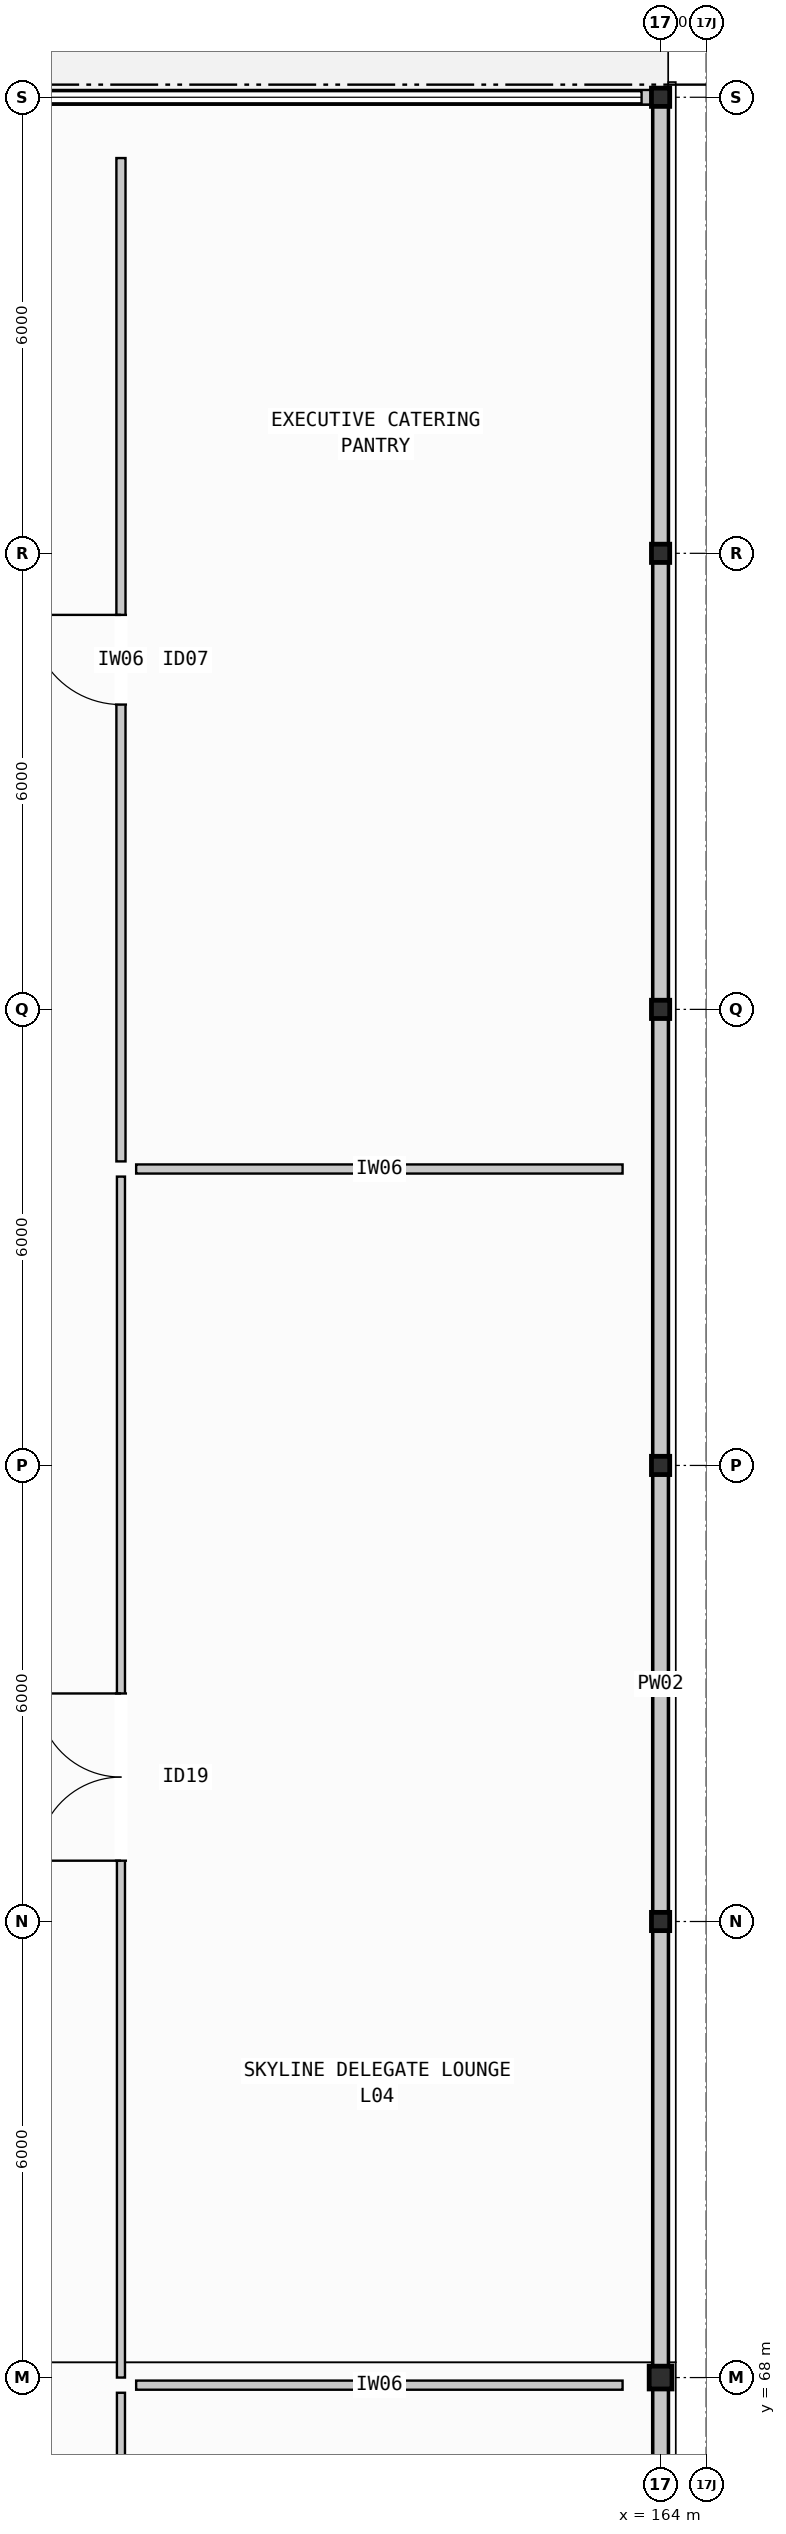
"""IFC4 building model, lengths in metres.
Left out: names, types, materials, properties, quantities, classifications, styles, units other than length and angle.
Written with IfcOpenShell. Run it as: python <this file> out.ifc"""

import sys

from ifc_helpers import new_model, si_unit, direction, frame, frame_2d, origin, origin_2d, place, context, subcontext, project, spatial, rectangle, i_section, extrude, element, fill, save


model = new_model("IFC4")
c1 = context("Model", 3, precision=1e-05, world=origin(), true_north=direction((0.0, 1.0)))
c2 = subcontext(c1, "Body", "Model", "MODEL_VIEW")
j1 = project(units=[si_unit("LENGTHUNIT", "METRE"), si_unit("PLANEANGLEUNIT", "RADIAN")], contexts=[c1])
p1 = place(None, origin())
s1 = spatial("IfcSite", under=j1, at=p1, CompositionType="ELEMENT")
p2 = place(p1, origin())
s2 = spatial("IfcBuilding", under=s1, at=p2, CompositionType="ELEMENT")
p3 = place(p2, frame((0.0, 0.0, 21.6)))
s3 = spatial("IfcBuildingStorey", under=s2, at=p3, CompositionType="ELEMENT", Elevation=21.6)
p4 = place(p3, frame((164.0, 68.0, 0.0), z_axis=(0.0, 0.0, 1.0), x_axis=(1.0, 0.0, 0.0)))
e1 = element("IfcColumn", 1, at=p4, inside=s3, PredefinedType="COLUMN", context=c2, shape_type="SweptSolid", body=[
    extrude(i_section(OverallWidth=0.3, OverallDepth=0.3, WebThickness=0.011, FlangeThickness=0.019, FilletRadius=0.027, at=origin_2d()), origin(), (0.0, 0.0, 1.0), 4.8),
])
for number, where, z_axis, x_axis in (
    (2, (164.0, 74.0, 0.0), (0.0, 0.0, 1.0), (1.0, 0.0, 0.0)),
    (3, (164.0, 80.0, 0.0), (0.0, 0.0, 1.0), (1.0, 0.0, 0.0)),
    (4, (164.0, 86.0, 0.0), (0.0, 0.0, 1.0), (1.0, 0.0, 0.0)),
    (5, (164.0, 92.0, 0.0), (0.0, 0.0, 1.0), (1.0, 0.0, 0.0)),
    (6, (164.0, 98.0, 0.0), (0.0, 0.0, 1.0), (1.0, 0.0, 0.0)),
):
    element("IfcColumn", number, at=place(p3, frame(where, z_axis=z_axis, x_axis=x_axis)), inside=s3, PredefinedType="COLUMN", context=c2, shape_type="SweptSolid", body=[
        extrude(i_section(OverallWidth=0.24, OverallDepth=0.24, WebThickness=0.01, FlangeThickness=0.017, FilletRadius=0.021, at=origin_2d()), origin(), (0.0, 0.0, 1.0), 4.8),
    ])
p5 = place(p3, frame((164.0, 62.146, 0.0), z_axis=(0.0, 0.0, 1.0), x_axis=(0.0, 1.0, 0.0)))
e7 = element("IfcWall", 7, at=p5, inside=s3, PredefinedType="STANDARD", context=c2, shape_type="SweptSolid", body=[
    extrude(rectangle(XDim=5.708, YDim=0.222, at=frame_2d((2.854, 0.0))), origin(), (0.0, 0.0, 1.0), 4.0),
])
p6 = place(p3, frame((164.0, 68.146, 0.0), z_axis=(0.0, 0.0, 1.0), x_axis=(0.0, 1.0, 0.0)))
e8 = element("IfcWall", 8, at=p6, inside=s3, PredefinedType="STANDARD", context=c2, shape_type="SweptSolid", body=[
    extrude(rectangle(XDim=5.738, YDim=0.222, at=frame_2d((2.869, 0.0))), origin(), (0.0, 0.0, 1.0), 4.0),
])
for number, where, z_axis, x_axis in (
    (9, (164.0, 74.116, 0.0), (0.0, 0.0, 1.0), (0.0, 1.0, 0.0)),
    (10, (164.0, 80.116, 0.0), (0.0, 0.0, 1.0), (0.0, 1.0, 0.0)),
    (11, (164.0, 86.116, 0.0), (0.0, 0.0, 1.0), (0.0, 1.0, 0.0)),
    (12, (164.0, 92.116, 0.0), (0.0, 0.0, 1.0), (0.0, 1.0, 0.0)),
):
    element("IfcWall", number, at=place(p3, frame(where, z_axis=z_axis, x_axis=x_axis)), inside=s3, PredefinedType="STANDARD", context=c2, shape_type="SweptSolid", body=[
        extrude(rectangle(XDim=5.768, YDim=0.222, at=frame_2d((2.884, 0.0))), origin(), (0.0, 0.0, 1.0), 4.0),
    ])
p7 = place(p3, frame((164.0, 38.08, 4.8), z_axis=(0.0, 0.0, 1.0), x_axis=(0.0, 1.0, 0.0)))
e13 = element("IfcWall", 13, at=p7, inside=s3, PredefinedType="PARAPET", context=c2, shape_type="SweptSolid", body=[
    extrude(rectangle(XDim=59.84, YDim=0.192, at=frame_2d((29.92, 0.0))), origin(), (0.0, 0.0, 1.0), 0.95),
])
p8 = place(p3, frame((146.6, 98.0, 4.8), z_axis=(0.0, 0.0, 1.0), x_axis=(1.0, 0.0, 0.0)))
e14 = element("IfcWall", 14, at=p8, inside=s3, PredefinedType="PARAPET", context=c2, shape_type="SweptSolid", body=[
    extrude(rectangle(XDim=17.4, YDim=0.192, at=frame_2d((8.7, 0.0))), origin(), (0.0, 0.0, 1.0), 0.95),
])
p9 = place(p3, frame((156.9, 52.0, 0.0), z_axis=(0.0, 0.0, 1.0), x_axis=(0.0, 1.0, 0.0)))
e15 = element("IfcWall", 15, at=p9, inside=s3, PredefinedType="PARTITIONING", context=c2, shape_type="SweptSolid", body=[
    extrude(rectangle(XDim=15.8, YDim=0.106, at=frame_2d((7.9, 0.0))), origin(), (0.0, 0.0, 1.0), 4.0),
])
p10 = place(p9, frame((7.34, 0.0, 0.0)))
e16 = element("IfcOpeningElement", 16, at=p10, cuts=e15, PredefinedType="OPENING", context=c2, shape_type="SweptSolid", body=[
    extrude(rectangle(XDim=1.12, YDim=2.22, at=frame_2d((0.56, 1.11))), frame((0.0, 0.063, 0.0), z_axis=(0.0, -1.0, 0.0), x_axis=(1.0, 0.0, 0.0)), (0.0, 0.0, 1.0), 0.126),
])
p11 = place(p3, frame((156.9, 68.0, 0.0), z_axis=(0.0, 0.0, 1.0), x_axis=(0.0, 1.0, 0.0)))
e17 = element("IfcWall", 17, at=p11, inside=s3, PredefinedType="PARTITIONING", context=c2, shape_type="SweptSolid", body=[
    extrude(rectangle(XDim=15.8, YDim=0.106, at=frame_2d((7.9, 0.0))), origin(), (0.0, 0.0, 1.0), 4.0),
])
p12 = place(p11, frame((6.8, 0.0, 0.0)))
e18 = element("IfcOpeningElement", 18, at=p12, cuts=e17, PredefinedType="OPENING", context=c2, shape_type="SweptSolid", body=[
    extrude(rectangle(XDim=2.2, YDim=2.34, at=frame_2d((1.1, 1.17))), frame((0.0, 0.063, 0.0), z_axis=(0.0, -1.0, 0.0), x_axis=(1.0, 0.0, 0.0)), (0.0, 0.0, 1.0), 0.126),
])
p13 = place(p3, frame((156.9, 84.0, 0.0), z_axis=(0.0, 0.0, 1.0), x_axis=(0.0, 1.0, 0.0)))
e19 = element("IfcWall", 19, at=p13, inside=s3, PredefinedType="PARTITIONING", context=c2, shape_type="SweptSolid", body=[
    extrude(rectangle(XDim=13.2, YDim=0.12, at=frame_2d((6.6, 0.0))), origin(), (0.0, 0.0, 1.0), 4.0),
])
p14 = place(p13, frame((6.01, 0.0, 0.0)))
e20 = element("IfcOpeningElement", 20, at=p14, cuts=e19, PredefinedType="OPENING", context=c2, shape_type="SweptSolid", body=[
    extrude(rectangle(XDim=1.18, YDim=2.25, at=frame_2d((0.59, 1.125))), frame((0.0, 0.07, 0.0), z_axis=(0.0, -1.0, 0.0), x_axis=(1.0, 0.0, 0.0)), (0.0, 0.0, 1.0), 0.14),
])
for number, where, z_axis, x_axis in (
    (21, (157.1, 67.9, 0.0), (0.0, 0.0, 1.0), (1.0, 0.0, 0.0)),
    (22, (157.1, 83.9, 0.0), (0.0, 0.0, 1.0), (1.0, 0.0, 0.0)),
):
    element("IfcWall", number, at=place(p3, frame(where, z_axis=z_axis, x_axis=x_axis)), inside=s3, PredefinedType="PARTITIONING", context=c2, shape_type="SweptSolid", body=[
        extrude(rectangle(XDim=6.4, YDim=0.12, at=frame_2d((3.2, 0.0))), origin(), (0.0, 0.0, 1.0), 4.0),
    ])
p15 = place(p12, origin())
e23 = element("IfcDoor", 23, at=p15, inside=s3, OperationType="DOUBLE_DOOR_SINGLE_SWING", PredefinedType="DOOR", context=c2, shape_type="SweptSolid", body=[
    extrude(rectangle(XDim=2.2, YDim=2.34, at=frame_2d((1.1, 1.17))), frame((0.0, 0.025, 0.0), z_axis=(0.0, -1.0, 0.0), x_axis=(1.0, 0.0, 0.0)), (0.0, 0.0, 1.0), 0.05),
])
fill(e18, e23)
p16 = place(p14, origin())
e24 = element("IfcDoor", 24, at=p16, inside=s3, OperationType="SINGLE_SWING_RIGHT", PredefinedType="DOOR", context=c2, shape_type="SweptSolid", body=[
    extrude(rectangle(XDim=1.18, YDim=2.25, at=frame_2d((0.59, 1.125))), frame((0.0, 0.025, 0.0), z_axis=(0.0, -1.0, 0.0), x_axis=(1.0, 0.0, 0.0)), (0.0, 0.0, 1.0), 0.05),
])
fill(e20, e24)
save(model, sys.argv[1])
